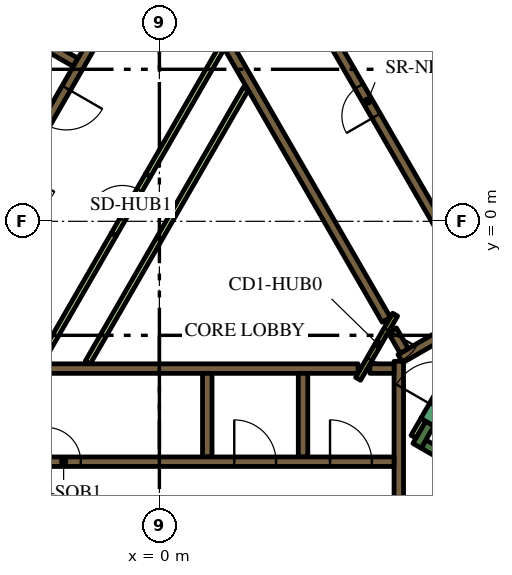
"""IFC4 building model, lengths in metres.
Left out: names, types, materials, properties, quantities, classifications, styles, units other than length and angle.
Written with IfcOpenShell. Run it as: python <this file> out.ifc"""

import sys

from ifc_helpers import new_model, si_unit, direction, frame, frame_2d, origin, place, context, subcontext, project, spatial, rectangle, extrude, element, fill, save


model = new_model("IFC4")
c1 = context("Model", 3, precision=1e-05, world=origin(), true_north=direction((0.0, 1.0)))
c2 = subcontext(c1, "Body", "Model", "MODEL_VIEW")
j1 = project(units=[si_unit("LENGTHUNIT", "METRE"), si_unit("PLANEANGLEUNIT", "RADIAN")], contexts=[c1])
p1 = place(None, origin())
s1 = spatial("IfcSite", under=j1, at=p1, CompositionType="ELEMENT")
p2 = place(p1, origin())
s2 = spatial("IfcBuilding", under=s1, at=p2, CompositionType="ELEMENT")
p3 = place(p2, frame((0.0, 0.0, 66.6)))
s3 = spatial("IfcBuildingStorey", under=s2, at=p3, CompositionType="ELEMENT", Elevation=66.6)
p4 = place(p3, frame((6.461, 13.909, 0.0), z_axis=(0.0, 0.0, 1.0), x_axis=(0.500005804227, -0.866022052686, 0.0)))
e1 = element("IfcWall", 1, at=p4, inside=s3, PredefinedType="SOLIDWALL", context=c2, shape_type="SweptSolid", body=[
    extrude(rectangle(XDim=20.834, YDim=0.9, at=frame_2d((10.417, 0.0))), origin(), (0.0, 0.0, 1.0), 3.9),
])
p5 = place(p3, frame((12.84, -9.261, 0.0), z_axis=(0.0, 0.0, 1.0), x_axis=(-0.866013990052, 0.500019768644, 0.0)))
e2 = element("IfcWall", 2, at=p5, inside=s3, PredefinedType="SOLIDWALL", context=c2, shape_type="SweptSolid", body=[
    extrude(rectangle(XDim=6.8, YDim=0.25, at=frame_2d((3.4, 0.0))), origin(), (0.0, 0.0, 1.0), 3.9),
])
p6 = place(p3, frame((6.78, -5.906, 0.0), z_axis=(0.0, 0.0, 1.0), x_axis=(0.500223362819, 0.865896406789, 0.0)))
e3 = element("IfcWall", 3, at=p6, inside=s3, PredefinedType="SOLIDWALL", context=c2, shape_type="SweptSolid", body=[
    extrude(rectangle(XDim=0.675, YDim=0.25, at=frame_2d((0.337, 0.0))), origin(), (0.0, 0.0, 1.0), 3.9),
])
p7 = place(p3, frame((-5.259, -3.875, 0.0), z_axis=(0.0, 0.0, 1.0), x_axis=(1.0, 0.0, 0.0)))
e4 = element("IfcWall", 4, at=p7, inside=s3, PredefinedType="SOLIDWALL", context=c2, shape_type="SweptSolid", body=[
    extrude(rectangle(XDim=10.489, YDim=0.25, at=frame_2d((5.244, 0.0))), origin(), (0.0, 0.0, 1.0), 3.9),
])
for number, where, z_axis, x_axis in (
    (5, (3.78, -4.0, 0.0), (0.0, 0.0, 1.0), (0.0, -1.0, 0.0)),
    (6, (1.26, -4.0, 0.0), (0.0, 0.0, 1.0), (0.0, -1.0, 0.0)),
):
    element("IfcWall", number, at=place(p3, frame(where, z_axis=z_axis, x_axis=x_axis)), inside=s3, PredefinedType="SOLIDWALL", context=c2, shape_type="SweptSolid", body=[
        extrude(rectangle(XDim=2.2, YDim=0.25, at=frame_2d((1.1, 0.0))), origin(), (0.0, 0.0, 1.0), 3.9),
    ])
p8 = place(p3, frame((6.3, -7.27, 0.0), z_axis=(0.0, 0.0, 1.0), x_axis=(0.0, 1.0, 0.0)))
e7 = element("IfcWall", 7, at=p8, inside=s3, PredefinedType="SOLIDWALL", context=c2, shape_type="SweptSolid", body=[
    extrude(rectangle(XDim=3.586, YDim=0.25, at=frame_2d((1.793, 0.0))), origin(), (0.0, 0.0, 1.0), 3.9),
])
p9 = place(p3, frame((5.538, -3.875, 0.0), z_axis=(0.0, 0.0, 1.0), x_axis=(1.0, 0.0, 0.0)))
e8 = element("IfcWall", 8, at=p9, inside=s3, PredefinedType="SOLIDWALL", context=c2, shape_type="SweptSolid", body=[
    extrude(rectangle(XDim=0.637, YDim=0.25, at=frame_2d((0.318, 0.0))), origin(), (0.0, 0.0, 1.0), 3.9),
])
p10 = place(p3, frame((9.346, -1.879, 0.0), z_axis=(0.0, 0.0, 1.0), x_axis=(-0.866048528039, -0.499959945477, 0.0)))
e9 = element("IfcWall", 9, at=p10, inside=s3, PredefinedType="SOLIDWALL", context=c2, shape_type="SweptSolid", body=[
    extrude(rectangle(XDim=3.47, YDim=0.25, at=frame_2d((1.735, 0.0))), origin(), (0.0, 0.0, 1.0), 3.9),
])
p11 = place(p3, frame((6.13, -2.867, 0.0), z_axis=(0.0, 0.0, 1.0), x_axis=(0.500160776593, -0.865932559475, 0.0)))
e10 = element("IfcWall", 10, at=p11, inside=s3, PredefinedType="SOLIDWALL", context=c2, shape_type="SweptSolid", body=[
    extrude(rectangle(XDim=0.627, YDim=0.25, at=frame_2d((0.313, 0.0))), origin(), (0.0, 0.0, 1.0), 3.9),
])
p12 = place(p3, frame((5.97, -2.591, 0.0), z_axis=(0.0, 0.0, 1.0), x_axis=(-0.499994469932, 0.866028596547, 0.0)))
e11 = element("IfcWall", 11, at=p12, inside=s3, PredefinedType="SOLIDWALL", context=c2, shape_type="SweptSolid", body=[
    extrude(rectangle(XDim=10.488, YDim=0.25, at=frame_2d((5.244, 0.0))), origin(), (0.0, 0.0, 1.0), 3.9),
])
p13 = place(p3, frame((-8.06, -1.311, 0.0), z_axis=(0.0, 0.0, 1.0), x_axis=(0.50000273126, 0.866023826885, 0.0)))
e12 = element("IfcWall", 12, at=p13, inside=s3, PredefinedType="SOLIDWALL", context=c2, shape_type="SweptSolid", body=[
    extrude(rectangle(XDim=10.33, YDim=0.25, at=frame_2d((5.165, 0.0))), origin(), (0.0, 0.0, 1.0), 3.9),
])
p14 = place(p3, frame((-2.204, 4.182, 0.0), z_axis=(0.0, 0.0, 1.0), x_axis=(-0.866008176907, 0.50002983664, 0.0)))
e13 = element("IfcWall", 13, at=p14, inside=s3, PredefinedType="SOLIDWALL", context=c2, shape_type="SweptSolid", body=[
    extrude(rectangle(XDim=2.2, YDim=0.25, at=frame_2d((1.1, 0.0))), origin(), (0.0, 0.0, 1.0), 3.9),
])
p15 = place(p3, frame((-3.147, -3.718, 0.0), z_axis=(0.0, 0.0, 1.0), x_axis=(0.500010131483, 0.866019554291, 0.0)))
e14 = element("IfcWall", 14, at=p15, inside=s3, PredefinedType="PARTITIONING", context=c2, shape_type="SweptSolid", body=[
    extrude(rectangle(XDim=3.894, YDim=0.15, at=frame_2d((1.947, 0.0))), origin(), (0.0, 0.0, 1.0), 2.75),
])
p16 = place(p3, frame((6.945, -5.222, 0.0), z_axis=(0.0, 0.0, 1.0), x_axis=(-0.499818422106, -0.866130212453, 0.0)))
e15 = element("IfcWall", 15, at=p16, inside=s3, PredefinedType="PARTITIONING", context=c2, shape_type="SweptSolid", body=[
    extrude(rectangle(XDim=0.514, YDim=0.15, at=frame_2d((0.257, 0.0))), origin(), (0.0, 0.0, 1.0), 2.75),
])
p17 = place(p3, frame((-1.887, -3.718, 0.0), z_axis=(0.0, 0.0, 1.0), x_axis=(0.500005008002, 0.866022512394, 0.0)))
e16 = element("IfcWall", 16, at=p17, inside=s3, PredefinedType="PARTITIONING", context=c2, shape_type="SweptSolid", body=[
    extrude(rectangle(XDim=8.327, YDim=0.15, at=frame_2d((4.164, 0.0))), origin(), (0.0, 0.0, 1.0), 2.75),
])
p18 = place(p3, frame((-0.3, 1.212, 0.0), z_axis=(0.0, 0.0, 1.0), x_axis=(0.499963101113, 0.866046706318, 0.0)))
e17 = element("IfcWall", 17, at=p18, inside=s3, PredefinedType="PARTITIONING", context=c2, shape_type="SweptSolid", body=[
    extrude(rectangle(XDim=3.893, YDim=0.15, at=frame_2d((1.947, 0.0))), origin(), (0.0, 0.0, 1.0), 2.75),
])
p19 = place(p3, frame((-6.175, -6.325, 0.0), z_axis=(0.0, 0.0, 1.0), x_axis=(1.0, 0.0, 0.0)))
e18 = element("IfcWall", 18, at=p19, inside=s3, PredefinedType="SOLIDWALL", context=c2, shape_type="SweptSolid", body=[
    extrude(rectangle(XDim=12.35, YDim=0.25, at=frame_2d((6.175, 0.0))), origin(), (0.0, 0.0, 1.0), 3.9),
])
p20 = place(p19, frame((3.205, 0.0, 0.0)))
e19 = element("IfcOpeningElement", 19, at=p20, cuts=e18, PredefinedType="OPENING", context=c2, shape_type="SweptSolid", body=[
    extrude(rectangle(XDim=0.9, YDim=2.1, at=frame_2d((0.45, 1.05))), frame((0.0, 0.135, 0.0), z_axis=(0.0, -1.0, 0.0), x_axis=(1.0, 0.0, 0.0)), (0.0, 0.0, 1.0), 0.27),
])
p21 = place(p19, frame((8.145, 0.0, 0.0)))
e20 = element("IfcOpeningElement", 20, at=p21, cuts=e18, PredefinedType="OPENING", context=c2, shape_type="SweptSolid", body=[
    extrude(rectangle(XDim=1.1, YDim=2.1, at=frame_2d((0.55, 1.05))), frame((0.0, 0.135, 0.0), z_axis=(0.0, -1.0, 0.0), x_axis=(1.0, 0.0, 0.0)), (0.0, 0.0, 1.0), 0.27),
])
p22 = place(p19, frame((10.665, 0.0, 0.0)))
e21 = element("IfcOpeningElement", 21, at=p22, cuts=e18, PredefinedType="OPENING", context=c2, shape_type="SweptSolid", body=[
    extrude(rectangle(XDim=1.1, YDim=2.1, at=frame_2d((0.55, 1.05))), frame((0.0, 0.135, 0.0), z_axis=(0.0, -1.0, 0.0), x_axis=(1.0, 0.0, 0.0)), (0.0, 0.0, 1.0), 0.27),
])
p23 = place(p3, frame((11.553, -0.46, 0.0), z_axis=(0.0, 0.0, 1.0), x_axis=(-0.500006514828, 0.866021642414, 0.0)))
e22 = element("IfcWall", 22, at=p23, inside=s3, PredefinedType="SOLIDWALL", context=c2, shape_type="SweptSolid", body=[
    extrude(rectangle(XDim=12.35, YDim=0.25, at=frame_2d((6.175, 0.0))), origin(), (0.0, 0.0, 1.0), 3.9),
])
p24 = place(p23, frame((0.585, 0.0, 0.0)))
e23 = element("IfcOpeningElement", 23, at=p24, cuts=e22, PredefinedType="OPENING", context=c2, shape_type="SweptSolid", body=[
    extrude(rectangle(XDim=1.1, YDim=2.1, at=frame_2d((0.55, 1.05))), frame((0.0, 0.135, 0.0), z_axis=(0.0, -1.0, 0.0), x_axis=(1.0, 0.0, 0.0)), (0.0, 0.0, 1.0), 0.27),
])
p25 = place(p23, frame((3.105, 0.0, 0.0)))
e24 = element("IfcOpeningElement", 24, at=p25, cuts=e22, PredefinedType="OPENING", context=c2, shape_type="SweptSolid", body=[
    extrude(rectangle(XDim=1.1, YDim=2.1, at=frame_2d((0.55, 1.05))), frame((0.0, 0.135, 0.0), z_axis=(0.0, -1.0, 0.0), x_axis=(1.0, 0.0, 0.0)), (0.0, 0.0, 1.0), 0.27),
])
p26 = place(p23, frame((5.625, 0.0, 0.0)))
e25 = element("IfcOpeningElement", 25, at=p26, cuts=e22, PredefinedType="OPENING", context=c2, shape_type="SweptSolid", body=[
    extrude(rectangle(XDim=1.1, YDim=2.1, at=frame_2d((0.55, 1.05))), frame((0.0, 0.135, 0.0), z_axis=(0.0, -1.0, 0.0), x_axis=(1.0, 0.0, 0.0)), (0.0, 0.0, 1.0), 0.27),
])
p27 = place(p3, frame((8.565, -2.185, 0.0), z_axis=(0.0, 0.0, 1.0), x_axis=(-0.499997954832, 0.866026584559, 0.0)))
e26 = element("IfcWall", 26, at=p27, inside=s3, PredefinedType="SOLIDWALL", context=c2, shape_type="SweptSolid", body=[
    extrude(rectangle(XDim=12.35, YDim=0.25, at=frame_2d((6.175, 0.0))), origin(), (0.0, 0.0, 1.0), 3.9),
])
p28 = place(p27, frame((5.725, 0.0, 0.0)))
e27 = element("IfcOpeningElement", 27, at=p28, cuts=e26, PredefinedType="OPENING", context=c2, shape_type="SweptSolid", body=[
    extrude(rectangle(XDim=0.9, YDim=2.1, at=frame_2d((0.45, 1.05))), frame((0.0, 0.135, 0.0), z_axis=(0.0, -1.0, 0.0), x_axis=(1.0, 0.0, 0.0)), (0.0, 0.0, 1.0), 0.27),
])
p29 = place(p3, frame((-0.898, 6.194, 0.0), z_axis=(0.0, 0.0, 1.0), x_axis=(-0.499996202215, -0.866027596426, 0.0)))
e28 = element("IfcWall", 28, at=p29, inside=s3, PredefinedType="SOLIDWALL", context=c2, shape_type="SweptSolid", body=[
    extrude(rectangle(XDim=9.83, YDim=0.25, at=frame_2d((4.915, 0.0))), origin(), (0.0, 0.0, 1.0), 3.9),
])
p30 = place(p29, frame((0.585, 0.0, 0.0)))
e29 = element("IfcOpeningElement", 29, at=p30, cuts=e28, PredefinedType="OPENING", context=c2, shape_type="SweptSolid", body=[
    extrude(rectangle(XDim=1.1, YDim=2.1, at=frame_2d((0.55, 1.05))), frame((0.0, 0.135, 0.0), z_axis=(0.0, -1.0, 0.0), x_axis=(1.0, 0.0, 0.0)), (0.0, 0.0, 1.0), 0.27),
])
p31 = place(p29, frame((3.105, 0.0, 0.0)))
e30 = element("IfcOpeningElement", 30, at=p31, cuts=e28, PredefinedType="OPENING", context=c2, shape_type="SweptSolid", body=[
    extrude(rectangle(XDim=1.1, YDim=2.1, at=frame_2d((0.55, 1.05))), frame((0.0, 0.135, 0.0), z_axis=(0.0, -1.0, 0.0), x_axis=(1.0, 0.0, 0.0)), (0.0, 0.0, 1.0), 0.27),
])
p32 = place(p29, frame((5.625, 0.0, 0.0)))
e31 = element("IfcOpeningElement", 31, at=p32, cuts=e28, PredefinedType="OPENING", context=c2, shape_type="SweptSolid", body=[
    extrude(rectangle(XDim=1.1, YDim=2.1, at=frame_2d((0.55, 1.05))), frame((0.0, 0.135, 0.0), z_axis=(0.0, -1.0, 0.0), x_axis=(1.0, 0.0, 0.0)), (0.0, 0.0, 1.0), 0.27),
])
p33 = place(p29, frame((8.145, 0.0, 0.0)))
e32 = element("IfcOpeningElement", 32, at=p33, cuts=e28, PredefinedType="OPENING", context=c2, shape_type="SweptSolid", body=[
    extrude(rectangle(XDim=1.1, YDim=2.1, at=frame_2d((0.55, 1.05))), frame((0.0, 0.135, 0.0), z_axis=(0.0, -1.0, 0.0), x_axis=(1.0, 0.0, 0.0)), (0.0, 0.0, 1.0), 0.27),
])
p34 = place(p3, frame((7.053, -5.284, 0.0), z_axis=(0.0, 0.0, 1.0), x_axis=(0.500078061341, 0.865980330357, 0.0)))
e33 = element("IfcWall", 33, at=p34, inside=s3, PredefinedType="SOLIDWALL", context=c2, shape_type="SweptSolid", body=[
    extrude(rectangle(XDim=2.1, YDim=0.4, at=frame_2d((1.05, 0.0))), origin(), (0.0, 0.0, 1.0), 3.9),
])
p35 = place(p34, frame((0.45, 0.0, 0.0)))
e34 = element("IfcOpeningElement", 34, at=p35, cuts=e33, PredefinedType="OPENING", context=c2, shape_type="SweptSolid", body=[
    extrude(rectangle(XDim=1.2, YDim=2.1, at=frame_2d((0.6, 1.05))), frame((0.0, 0.21, 0.0), z_axis=(0.0, -1.0, 0.0), x_axis=(1.0, 0.0, 0.0)), (0.0, 0.0, 1.0), 0.42),
])
p36 = place(p3, frame((6.203, -2.456, 0.0), z_axis=(0.0, 0.0, 1.0), x_axis=(-0.500043961785, -0.866000020948, 0.0)))
e35 = element("IfcWall", 35, at=p36, inside=s3, PredefinedType="PARTITIONING", context=c2, shape_type="SweptSolid", body=[
    extrude(rectangle(XDim=1.95, YDim=0.15, at=frame_2d((0.975, 0.0))), origin(), (0.0, 0.0, 1.0), 3.9),
])
p37 = place(p36, frame((0.45, 0.0, 0.0)))
e36 = element("IfcOpeningElement", 36, at=p37, cuts=e35, PredefinedType="OPENING", context=c2, shape_type="SweptSolid", body=[
    extrude(rectangle(XDim=0.9, YDim=2.1, at=frame_2d((0.45, 1.05))), frame((0.0, 0.085, 0.0), z_axis=(0.0, -1.0, 0.0), x_axis=(1.0, 0.0, 0.0)), (0.0, 0.0, 1.0), 0.17),
])
p38 = place(p3, frame((-1.2, -0.346, 0.0), z_axis=(0.0, 0.0, 1.0), x_axis=(0.499961193289, 0.866047807691, 0.0)))
e37 = element("IfcWall", 37, at=p38, inside=s3, PredefinedType="PARTITIONING", context=c2, shape_type="SweptSolid", body=[
    extrude(rectangle(XDim=1.8, YDim=0.15, at=frame_2d((0.9, 0.0))), origin(), (0.0, 0.0, 1.0), 2.75),
])
p39 = place(p38, frame((0.45, 0.0, 0.0)))
e38 = element("IfcOpeningElement", 38, at=p39, cuts=e37, PredefinedType="OPENING", context=c2, shape_type="SweptSolid", body=[
    extrude(rectangle(XDim=0.9, YDim=2.1, at=frame_2d((0.45, 1.05))), frame((0.0, 0.085, 0.0), z_axis=(0.0, -1.0, 0.0), x_axis=(1.0, 0.0, 0.0)), (0.0, 0.0, 1.0), 0.17),
])
p40 = place(p3, frame((6.163, 18.475, 0.0), z_axis=(0.0, 0.0, 1.0), x_axis=(0.500001317485, -0.866024643133, 0.0)))
e39 = element("IfcWall", 39, at=p40, inside=s3, PredefinedType="PARTITIONING", context=c2, shape_type="SweptSolid", body=[
    extrude(rectangle(XDim=25.767, YDim=0.15, at=frame_2d((12.883, 0.0))), origin(), (0.0, 0.0, 1.0), 2.75),
])
p41 = place(p40, frame((21.138, 0.0, 0.0)))
e40 = element("IfcOpeningElement", 40, at=p41, cuts=e39, PredefinedType="OPENING", context=c2, shape_type="SweptSolid", body=[
    extrude(rectangle(XDim=1.0, YDim=2.1, at=frame_2d((0.5, 1.05))), frame((0.0, 0.085, 0.0), z_axis=(0.0, -1.0, 0.0), x_axis=(1.0, 0.0, 0.0)), (0.0, 0.0, 1.0), 0.17),
])
p42 = place(p40, frame((9.948, 0.0, 0.0)))
e41 = element("IfcOpeningElement", 41, at=p42, cuts=e39, PredefinedType="OPENING", context=c2, shape_type="SweptSolid", body=[
    extrude(rectangle(XDim=1.1, YDim=2.1, at=frame_2d((0.55, 1.05))), frame((0.0, 0.085, 0.0), z_axis=(0.0, -1.0, 0.0), x_axis=(1.0, 0.0, 0.0)), (0.0, 0.0, 1.0), 0.17),
])
p43 = place(p40, frame((8.641, 0.0, 0.0)))
e42 = element("IfcOpeningElement", 42, at=p43, cuts=e39, PredefinedType="OPENING", context=c2, shape_type="SweptSolid", body=[
    extrude(rectangle(XDim=1.0, YDim=2.1, at=frame_2d((0.5, 1.05))), frame((0.0, 0.085, 0.0), z_axis=(0.0, -1.0, 0.0), x_axis=(1.0, 0.0, 0.0)), (0.0, 0.0, 1.0), 0.17),
])
p44 = place(p40, frame((0.18, 0.0, 0.0)))
e43 = element("IfcOpeningElement", 43, at=p44, cuts=e39, PredefinedType="OPENING", context=c2, shape_type="SweptSolid", body=[
    extrude(rectangle(XDim=1.0, YDim=2.1, at=frame_2d((0.5, 1.05))), frame((0.0, 0.085, 0.0), z_axis=(0.0, -1.0, 0.0), x_axis=(1.0, 0.0, 0.0)), (0.0, 0.0, 1.0), 0.17),
])
p45 = place(p20, origin())
e44 = element("IfcDoor", 44, at=p45, inside=s3, OperationType="SINGLE_SWING_LEFT", PredefinedType="DOOR", context=c2, shape_type="SweptSolid", body=[
    extrude(rectangle(XDim=0.9, YDim=2.1, at=frame_2d((0.45, 1.05))), frame((0.0, 0.025, 0.0), z_axis=(0.0, -1.0, 0.0), x_axis=(1.0, 0.0, 0.0)), (0.0, 0.0, 1.0), 0.05),
])
fill(e19, e44)
p46 = place(p21, origin())
e45 = element("IfcDoor", 45, at=p46, inside=s3, OperationType="DOUBLE_DOOR_SLIDING", PredefinedType="DOOR", context=c2, shape_type="SweptSolid", body=[
    extrude(rectangle(XDim=1.1, YDim=2.1, at=frame_2d((0.55, 1.05))), frame((0.0, 0.025, 0.0), z_axis=(0.0, -1.0, 0.0), x_axis=(1.0, 0.0, 0.0)), (0.0, 0.0, 1.0), 0.05),
])
fill(e20, e45)
p47 = place(p22, origin())
e46 = element("IfcDoor", 46, at=p47, inside=s3, OperationType="DOUBLE_DOOR_SLIDING", PredefinedType="DOOR", context=c2, shape_type="SweptSolid", body=[
    extrude(rectangle(XDim=1.1, YDim=2.1, at=frame_2d((0.55, 1.05))), frame((0.0, 0.025, 0.0), z_axis=(0.0, -1.0, 0.0), x_axis=(1.0, 0.0, 0.0)), (0.0, 0.0, 1.0), 0.05),
])
fill(e21, e46)
p48 = place(p28, origin())
e47 = element("IfcDoor", 47, at=p48, inside=s3, OperationType="SINGLE_SWING_LEFT", PredefinedType="DOOR", context=c2, shape_type="SweptSolid", body=[
    extrude(rectangle(XDim=0.9, YDim=2.1, at=frame_2d((0.45, 1.05))), frame((0.0, 0.025, 0.0), z_axis=(0.0, -1.0, 0.0), x_axis=(1.0, 0.0, 0.0)), (0.0, 0.0, 1.0), 0.05),
])
fill(e27, e47)
p49 = place(p31, origin())
e48 = element("IfcDoor", 48, at=p49, inside=s3, OperationType="DOUBLE_DOOR_SLIDING", PredefinedType="DOOR", context=c2, shape_type="SweptSolid", body=[
    extrude(rectangle(XDim=1.1, YDim=2.1, at=frame_2d((0.55, 1.05))), frame((0.0, 0.025, 0.0), z_axis=(0.0, -1.0, 0.0), x_axis=(1.0, 0.0, 0.0)), (0.0, 0.0, 1.0), 0.05),
])
fill(e30, e48)
p50 = place(p37, origin())
e49 = element("IfcDoor", 49, at=p50, inside=s3, OperationType="SINGLE_SWING_LEFT", PredefinedType="DOOR", context=c2, shape_type="SweptSolid", body=[
    extrude(rectangle(XDim=0.9, YDim=2.1, at=frame_2d((0.45, 1.05))), frame((0.0, 0.025, 0.0), z_axis=(0.0, -1.0, 0.0), x_axis=(1.0, 0.0, 0.0)), (0.0, 0.0, 1.0), 0.05),
])
fill(e36, e49)
p51 = place(p39, origin())
e50 = element("IfcDoor", 50, at=p51, inside=s3, OperationType="SINGLE_SWING_LEFT", PredefinedType="DOOR", context=c2, shape_type="SweptSolid", body=[
    extrude(rectangle(XDim=0.9, YDim=2.1, at=frame_2d((0.45, 1.05))), frame((0.0, 0.025, 0.0), z_axis=(0.0, -1.0, 0.0), x_axis=(1.0, 0.0, 0.0)), (0.0, 0.0, 1.0), 0.05),
])
fill(e38, e50)
save(model, sys.argv[1])
